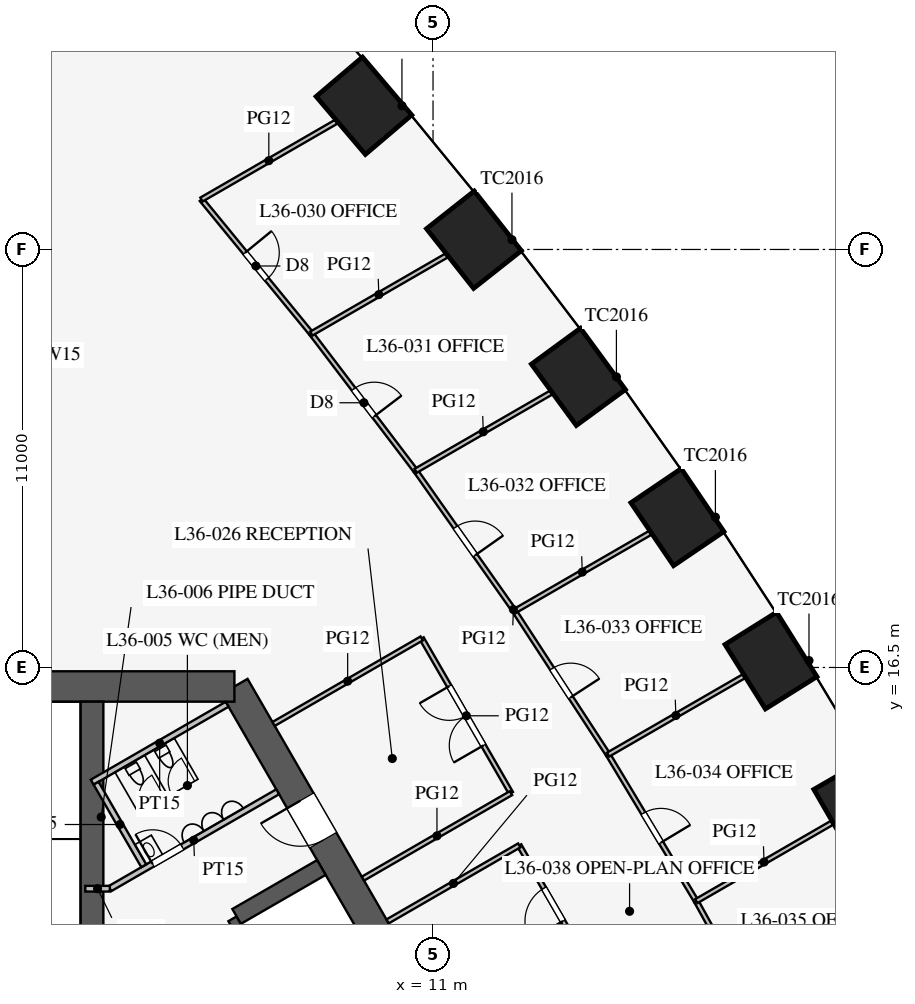
"""IFC4 building model, lengths in metres.
Left out: names, types, materials, properties, quantities, classifications, styles, units other than length and angle.
Written with IfcOpenShell. Run it as: python <this file> out.ifc"""

import sys

from ifc_helpers import new_model, si_unit, direction, frame, frame_2d, origin, origin_2d, place, context, subcontext, project, spatial, rectangle, extrude, element, fill, save


model = new_model("IFC4")
c1 = context("Model", 3, precision=1e-05, world=origin(), true_north=direction((0.0, 1.0)))
c2 = subcontext(c1, "Body", "Model", "MODEL_VIEW")
j1 = project(units=[si_unit("LENGTHUNIT", "METRE"), si_unit("PLANEANGLEUNIT", "RADIAN")], contexts=[c1])
p1 = place(None, origin())
s1 = spatial("IfcSite", under=j1, at=p1, CompositionType="ELEMENT")
p2 = place(p1, origin())
s2 = spatial("IfcBuilding", under=s1, at=p2, CompositionType="ELEMENT")
p3 = place(p2, frame((0.0, 0.0, 157.7)))
s3 = spatial("IfcBuildingStorey", under=s2, at=p3, CompositionType="ELEMENT", Elevation=157.7)
for number, where, z_axis, x_axis in (
    (1, (22.213, 12.825, 0.0), (0.0, 0.0, 1.0), (-0.5, 0.866, 0.0)),
    (2, (19.893, 16.681, 0.0), (0.0, 0.0, 1.0), (-0.531, 0.847, 0.0)),
    (3, (17.43, 20.456, 0.0), (0.0, 0.0, 1.0), (-0.561, 0.828, 0.0)),
    (4, (14.825, 24.148, 0.0), (0.0, 0.0, 1.0), (-0.591, 0.807, 0.0)),
    (5, (12.077, 27.757, 0.0), (0.0, 0.0, 1.0), (-0.62, 0.785, 0.0)),
    (6, (9.182, 31.282, 0.0), (0.0, 0.0, 1.0), (-0.648, 0.762, 0.0)),
):
    element("IfcColumn", number, at=place(p3, frame(where, z_axis=z_axis, x_axis=x_axis)), inside=s3, PredefinedType="COLUMN", context=c2, shape_type="SweptSolid", body=[
        extrude(rectangle(XDim=2.0, YDim=1.6, at=origin_2d()), origin(), (0.0, 0.0, 1.0), 4.2),
    ])
p4 = place(p3, frame((16.743, -3.0, 0.0), z_axis=(0.0, 0.0, 1.0), x_axis=(-0.500002442456, 0.866023993627, 0.0)))
e7 = element("IfcWall", 7, at=p4, inside=s3, PredefinedType="SHEAR", context=c2, shape_type="SweptSolid", body=[
    extrude(rectangle(XDim=21.939, YDim=0.8, at=frame_2d((10.97, 0.0))), origin(), (0.0, 0.0, 1.0), 4.2),
])
p5 = place(p4, frame((17.27, 0.0, 0.0)))
e8 = element("IfcOpeningElement", 8, at=p5, cuts=e7, PredefinedType="OPENING", context=c2, shape_type="SweptSolid", body=[
    extrude(rectangle(XDim=1.2, YDim=2.1, at=frame_2d((0.6, 1.05))), frame((0.0, 0.41, 0.0), z_axis=(0.0, -1.0, 0.0), x_axis=(1.0, 0.0, 0.0)), (0.0, 0.0, 1.0), 0.82),
])
p6 = place(p4, frame((3.47, 0.0, 0.0)))
e9 = element("IfcOpeningElement", 9, at=p6, cuts=e7, PredefinedType="OPENING", context=c2, shape_type="SweptSolid", body=[
    extrude(rectangle(XDim=1.2, YDim=2.1, at=frame_2d((0.6, 1.05))), frame((0.0, 0.41, 0.0), z_axis=(0.0, -1.0, 0.0), x_axis=(1.0, 0.0, 0.0)), (0.0, 0.0, 1.0), 0.82),
])
p7 = place(p3, frame((5.773, 16.0, 0.0), z_axis=(0.0, 0.0, 1.0), x_axis=(-1.0, 0.0, 0.0)))
e10 = element("IfcWall", 10, at=p7, inside=s3, PredefinedType="SHEAR", context=c2, shape_type="SweptSolid", body=[
    extrude(rectangle(XDim=11.547, YDim=0.8, at=frame_2d((5.773, 0.0))), origin(), (0.0, 0.0, 1.0), 4.2),
])
p8 = place(p3, frame((11.424, 0.014, 0.0), z_axis=(0.0, 0.0, 1.0), x_axis=(-0.500001763848, 0.866024385424, 0.0)))
e11 = element("IfcWall", 11, at=p8, inside=s3, PredefinedType="SHEAR", context=c2, shape_type="SweptSolid", body=[
    extrude(rectangle(XDim=11.4, YDim=0.25, at=frame_2d((5.7, 0.0))), origin(), (0.0, 0.0, 1.0), 4.2),
])
p9 = place(p8, frame((0.975, 0.0, 0.0)))
e12 = element("IfcOpeningElement", 12, at=p9, cuts=e11, PredefinedType="OPENING", context=c2, shape_type="SweptSolid", body=[
    extrude(rectangle(XDim=0.9, YDim=2.1, at=frame_2d((0.45, 1.05))), frame((0.0, 0.135, 0.0), z_axis=(0.0, -1.0, 0.0), x_axis=(1.0, 0.0, 0.0)), (0.0, 0.0, 1.0), 0.27),
])
p10 = place(p8, frame((3.825, 0.0, 0.0)))
e13 = element("IfcOpeningElement", 13, at=p10, cuts=e11, PredefinedType="OPENING", context=c2, shape_type="SweptSolid", body=[
    extrude(rectangle(XDim=0.9, YDim=2.1, at=frame_2d((0.45, 1.05))), frame((0.0, 0.135, 0.0), z_axis=(0.0, -1.0, 0.0), x_axis=(1.0, 0.0, 0.0)), (0.0, 0.0, 1.0), 0.27),
])
p11 = place(p3, frame((5.832, 9.949, 0.0), z_axis=(0.0, 0.0, 1.0), x_axis=(0.866029291668, 0.499993265928, 0.0)))
e14 = element("IfcWall", 14, at=p11, inside=s3, PredefinedType="SHEAR", context=c2, shape_type="SweptSolid", body=[
    extrude(rectangle(XDim=2.575, YDim=0.45, at=frame_2d((1.288, 0.0))), origin(), (0.0, 0.0, 1.0), 4.2),
])
p12 = place(p3, frame((2.025, 6.525, 0.0), z_axis=(0.0, 0.0, 1.0), x_axis=(0.0, 1.0, 0.0)))
e15 = element("IfcWall", 15, at=p12, inside=s3, PredefinedType="SHEAR", context=c2, shape_type="SweptSolid", body=[
    extrude(rectangle(XDim=9.075, YDim=0.6, at=frame_2d((4.538, 0.0))), origin(), (0.0, 0.0, 1.0), 4.2),
])
p13 = place(p3, frame((2.495, 10.678, 0.0), z_axis=(0.0, 0.0, 1.0), x_axis=(0.86602216432, 0.500005610874, 0.0)))
e16 = element("IfcWall", 16, at=p13, inside=s3, PredefinedType="PARTITIONING", context=c2, shape_type="SweptSolid", body=[
    extrude(rectangle(XDim=5.1, YDim=0.15, at=frame_2d((2.55, 0.0))), origin(), (0.0, 0.0, 1.0), 4.0),
])
p14 = place(p13, frame((1.3, 0.0, 0.0)))
e17 = element("IfcOpeningElement", 17, at=p14, cuts=e16, PredefinedType="OPENING", context=c2, shape_type="SweptSolid", body=[
    extrude(rectangle(XDim=0.9, YDim=2.1, at=frame_2d((0.45, 1.05))), frame((0.0, 0.085, 0.0), z_axis=(0.0, -1.0, 0.0), x_axis=(1.0, 0.0, 0.0)), (0.0, 0.0, 1.0), 0.17),
])
p15 = place(p3, frame((2.495, 10.678, 0.0), z_axis=(0.0, 0.0, 1.0), x_axis=(-1.0, 0.0, 0.0)))
e18 = element("IfcWall", 18, at=p15, inside=s3, PredefinedType="PARTITIONING", context=c2, shape_type="SweptSolid", body=[
    extrude(rectangle(XDim=0.645, YDim=0.15, at=frame_2d((0.323, 0.0))), origin(), (0.0, 0.0, 1.0), 4.0),
])
p16 = place(p3, frame((2.031, 13.482, 0.0), z_axis=(0.0, 0.0, 1.0), x_axis=(0.866050731258, 0.499956128963, 0.0)))
e19 = element("IfcWall", 19, at=p16, inside=s3, PredefinedType="PARTITIONING", context=c2, shape_type="SweptSolid", body=[
    extrude(rectangle(XDim=4.1, YDim=0.15, at=frame_2d((2.05, 0.0))), origin(), (0.0, 0.0, 1.0), 4.0),
])
p17 = place(p3, frame((3.389, 11.281, 0.0), z_axis=(0.0, 0.0, 1.0), x_axis=(-0.499989096993, 0.866031698547, 0.0)))
e20 = element("IfcWall", 20, at=p17, inside=s3, PredefinedType="PARTITIONING", context=c2, shape_type="SweptSolid", body=[
    extrude(rectangle(XDim=2.51, YDim=0.15, at=frame_2d((1.255, 0.0))), origin(), (0.0, 0.0, 1.0), 4.0),
])
p18 = place(p3, frame((13.052, 13.194, 0.0), z_axis=(0.0, 0.0, 1.0), x_axis=(-0.499977259774, 0.866038532462, 0.0)))
e21 = element("IfcWall", 21, at=p18, inside=s3, PredefinedType="PARTITIONING", context=c2, shape_type="SweptSolid", body=[
    extrude(rectangle(XDim=4.7, YDim=0.12, at=frame_2d((2.35, 0.0))), origin(), (0.0, 0.0, 1.0), 2.9),
])
p19 = place(p18, frame((1.45, 0.0, 0.15)))
e22 = element("IfcOpeningElement", 22, at=p19, cuts=e21, PredefinedType="OPENING", context=c2, shape_type="SweptSolid", body=[
    extrude(rectangle(XDim=1.8, YDim=2.1, at=frame_2d((0.9, 1.05))), frame((0.0, 0.07, 0.0), z_axis=(0.0, -1.0, 0.0), x_axis=(1.0, 0.0, 0.0)), (0.0, 0.0, 1.0), 0.14),
])
p20 = place(p3, frame((15.069, 8.7, 0.0), z_axis=(0.0, 0.0, 1.0), x_axis=(-0.500012057535, 0.866018442252, 0.0)))
e23 = element("IfcWall", 23, at=p20, inside=s3, PredefinedType="PARTITIONING", context=c2, shape_type="SweptSolid", body=[
    extrude(rectangle(XDim=3.6, YDim=0.12, at=frame_2d((1.8, 0.0))), origin(), (0.0, 0.0, 1.0), 2.9),
])
p21 = place(p20, frame((1.3, 0.0, 0.15)))
e24 = element("IfcOpeningElement", 24, at=p21, cuts=e23, PredefinedType="OPENING", context=c2, shape_type="SweptSolid", body=[
    extrude(rectangle(XDim=1.0, YDim=2.1, at=frame_2d((0.5, 1.05))), frame((0.0, 0.07, 0.0), z_axis=(0.0, -1.0, 0.0), x_axis=(1.0, 0.0, 0.0)), (0.0, 0.0, 1.0), 0.14),
])
p22 = place(p3, frame((9.805, 9.818, 0.0), z_axis=(0.0, 0.0, 1.0), x_axis=(0.866026010844, 0.49999894854, 0.0)))
e25 = element("IfcWall", 25, at=p22, inside=s3, PredefinedType="PARTITIONING", context=c2, shape_type="SweptSolid", body=[
    extrude(rectangle(XDim=4.0, YDim=0.12, at=frame_2d((2.0, 0.0))), origin(), (0.0, 0.0, 1.0), 2.9),
])
p23 = place(p3, frame((9.155, 10.944, 0.0), z_axis=(0.0, 0.0, 1.0), x_axis=(0.866017533419, 0.500013631625, 0.0)))
e26 = element("IfcWall", 26, at=p23, inside=s3, PredefinedType="PARTITIONING", context=c2, shape_type="SweptSolid", body=[
    extrude(rectangle(XDim=4.5, YDim=0.12, at=frame_2d((2.25, 0.0))), origin(), (0.0, 0.0, 1.0), 2.9),
])
p24 = place(p3, frame((6.805, 15.014, 0.0), z_axis=(0.0, 0.0, 1.0), x_axis=(0.866031096941, 0.499990139034, 0.0)))
e27 = element("IfcWall", 27, at=p24, inside=s3, PredefinedType="PARTITIONING", context=c2, shape_type="SweptSolid", body=[
    extrude(rectangle(XDim=4.5, YDim=0.12, at=frame_2d((2.25, 0.0))), origin(), (0.0, 0.0, 1.0), 2.9),
])
p25 = place(p3, frame((17.927, 10.35, 0.0), z_axis=(0.0, 0.0, 1.0), x_axis=(-0.515548366618, 0.856860479703, 0.0)))
e28 = element("IfcWall", 28, at=p25, inside=s3, PredefinedType="PARTITIONING", context=c2, shape_type="SweptSolid", body=[
    extrude(rectangle(XDim=4.501, YDim=0.12, at=frame_2d((2.25, 0.0))), origin(), (0.0, 0.0, 1.0), 2.9),
])
p26 = place(p25, frame((1.8, 0.0, 0.15)))
e29 = element("IfcOpeningElement", 29, at=p26, cuts=e28, PredefinedType="OPENING", context=c2, shape_type="SweptSolid", body=[
    extrude(rectangle(XDim=0.9, YDim=2.1, at=frame_2d((0.45, 1.05))), frame((0.0, 0.07, 0.0), z_axis=(0.0, -1.0, 0.0), x_axis=(1.0, 0.0, 0.0)), (0.0, 0.0, 1.0), 0.14),
])
p27 = place(p3, frame((10.543, 21.675, 0.0), z_axis=(0.0, 0.0, 1.0), x_axis=(-0.605274299339, 0.796016973789, 0.0)))
e30 = element("IfcWall", 30, at=p27, inside=s3, PredefinedType="PARTITIONING", context=c2, shape_type="SweptSolid", body=[
    extrude(rectangle(XDim=4.536, YDim=0.12, at=frame_2d((2.268, 0.0))), origin(), (0.0, 0.0, 1.0), 2.9),
])
p28 = place(p27, frame((1.8, 0.0, 0.15)))
e31 = element("IfcOpeningElement", 31, at=p28, cuts=e30, PredefinedType="OPENING", context=c2, shape_type="SweptSolid", body=[
    extrude(rectangle(XDim=0.9, YDim=2.1, at=frame_2d((0.45, 1.05))), frame((0.0, 0.07, 0.0), z_axis=(0.0, -1.0, 0.0), x_axis=(1.0, 0.0, 0.0)), (0.0, 0.0, 1.0), 0.14),
])
p29 = place(p3, frame((7.797, 25.286, 0.0), z_axis=(0.0, 0.0, 1.0), x_axis=(-0.633843962561, 0.773460943503, 0.0)))
e32 = element("IfcWall", 32, at=p29, inside=s3, PredefinedType="PARTITIONING", context=c2, shape_type="SweptSolid", body=[
    extrude(rectangle(XDim=4.561, YDim=0.12, at=frame_2d((2.28, 0.0))), origin(), (0.0, 0.0, 1.0), 2.9),
])
p30 = place(p29, frame((1.85, 0.0, 0.15)))
e33 = element("IfcOpeningElement", 33, at=p30, cuts=e32, PredefinedType="OPENING", context=c2, shape_type="SweptSolid", body=[
    extrude(rectangle(XDim=0.9, YDim=2.1, at=frame_2d((0.45, 1.05))), frame((0.0, 0.07, 0.0), z_axis=(0.0, -1.0, 0.0), x_axis=(1.0, 0.0, 0.0)), (0.0, 0.0, 1.0), 0.14),
])
p31 = place(p3, frame((15.606, 14.206, 0.0), z_axis=(0.0, 0.0, 1.0), x_axis=(-0.546069464151, 0.837739900161, 0.0)))
e34 = element("IfcWall", 34, at=p31, inside=s3, PredefinedType="PARTITIONING", context=c2, shape_type="SweptSolid", body=[
    extrude(rectangle(XDim=4.507, YDim=0.12, at=frame_2d((2.253, 0.0))), origin(), (0.0, 0.0, 1.0), 2.9),
])
p32 = place(p31, frame((1.8, 0.0, 0.15)))
e35 = element("IfcOpeningElement", 35, at=p32, cuts=e34, PredefinedType="OPENING", context=c2, shape_type="SweptSolid", body=[
    extrude(rectangle(XDim=0.9, YDim=2.1, at=frame_2d((0.45, 1.05))), frame((0.0, 0.07, 0.0), z_axis=(0.0, -1.0, 0.0), x_axis=(1.0, 0.0, 0.0)), (0.0, 0.0, 1.0), 0.14),
])
p33 = place(p3, frame((13.145, 17.982, 0.0), z_axis=(0.0, 0.0, 1.0), x_axis=(-0.575987178736, 0.817458726745, 0.0)))
e36 = element("IfcWall", 36, at=p33, inside=s3, PredefinedType="PARTITIONING", context=c2, shape_type="SweptSolid", body=[
    extrude(rectangle(XDim=4.518, YDim=0.12, at=frame_2d((2.259, 0.0))), origin(), (0.0, 0.0, 1.0), 2.9),
])
p34 = place(p33, frame((1.8, 0.0, 0.15)))
e37 = element("IfcOpeningElement", 37, at=p34, cuts=e36, PredefinedType="OPENING", context=c2, shape_type="SweptSolid", body=[
    extrude(rectangle(XDim=0.9, YDim=2.1, at=frame_2d((0.45, 1.05))), frame((0.0, 0.07, 0.0), z_axis=(0.0, -1.0, 0.0), x_axis=(1.0, 0.0, 0.0)), (0.0, 0.0, 1.0), 0.14),
])
p35 = place(p3, frame((20.106, 6.412, 0.0), z_axis=(0.0, 0.0, 1.0), x_axis=(-0.484292898211, 0.874905931368, 0.0)))
e38 = element("IfcWall", 38, at=p35, inside=s3, PredefinedType="PARTITIONING", context=c2, shape_type="SweptSolid", body=[
    extrude(rectangle(XDim=4.501, YDim=0.12, at=frame_2d((2.25, 0.0))), origin(), (0.0, 0.0, 1.0), 2.9),
])
p36 = place(p35, frame((1.8, 0.0, 0.15)))
e39 = element("IfcOpeningElement", 39, at=p36, cuts=e38, PredefinedType="OPENING", context=c2, shape_type="SweptSolid", body=[
    extrude(rectangle(XDim=0.9, YDim=2.1, at=frame_2d((0.45, 1.05))), frame((0.0, 0.07, 0.0), z_axis=(0.0, -1.0, 0.0), x_axis=(1.0, 0.0, 0.0)), (0.0, 0.0, 1.0), 0.14),
])
p37 = place(p3, frame((17.927, 10.35, 0.0), z_axis=(0.0, 0.0, 1.0), x_axis=(0.866009926209, 0.50002680699, 0.0)))
e40 = element("IfcWall", 40, at=p37, inside=s3, PredefinedType="PARTITIONING", context=c2, shape_type="SweptSolid", body=[
    extrude(rectangle(XDim=4.12, YDim=0.12, at=frame_2d((2.06, 0.0))), origin(), (0.0, 0.0, 1.0), 2.8),
])
p38 = place(p3, frame((10.543, 21.675, 0.0), z_axis=(0.0, 0.0, 1.0), x_axis=(0.866019409031, 0.500010383074, 0.0)))
e41 = element("IfcWall", 41, at=p38, inside=s3, PredefinedType="PARTITIONING", context=c2, shape_type="SweptSolid", body=[
    extrude(rectangle(XDim=4.11, YDim=0.12, at=frame_2d((2.055, 0.0))), origin(), (0.0, 0.0, 1.0), 2.6),
])
p39 = place(p3, frame((7.797, 25.286, 0.0), z_axis=(0.0, 0.0, 1.0), x_axis=(0.866019112135, 0.500010897298, 0.0)))
e42 = element("IfcWall", 42, at=p39, inside=s3, PredefinedType="PARTITIONING", context=c2, shape_type="SweptSolid", body=[
    extrude(rectangle(XDim=4.103, YDim=0.12, at=frame_2d((2.052, 0.0))), origin(), (0.0, 0.0, 1.0), 2.8),
])
p40 = place(p3, frame((4.906, 28.813, 0.0), z_axis=(0.0, 0.0, 1.0), x_axis=(0.86601374377, 0.500020195194, 0.0)))
e43 = element("IfcWall", 43, at=p40, inside=s3, PredefinedType="PARTITIONING", context=c2, shape_type="SweptSolid", body=[
    extrude(rectangle(XDim=4.093, YDim=0.12, at=frame_2d((2.046, 0.0))), origin(), (0.0, 0.0, 1.0), 2.9),
])
p41 = place(p3, frame((15.606, 14.206, 0.0), z_axis=(0.0, 0.0, 1.0), x_axis=(0.866016800201, 0.500014901547, 0.0)))
e44 = element("IfcWall", 44, at=p41, inside=s3, PredefinedType="PARTITIONING", context=c2, shape_type="SweptSolid", body=[
    extrude(rectangle(XDim=4.119, YDim=0.12, at=frame_2d((2.06, 0.0))), origin(), (0.0, 0.0, 1.0), 2.8),
])
p42 = place(p3, frame((13.145, 17.982, 0.0), z_axis=(0.0, 0.0, 1.0), x_axis=(0.866018637367, 0.500011719595, 0.0)))
e45 = element("IfcWall", 45, at=p42, inside=s3, PredefinedType="PARTITIONING", context=c2, shape_type="SweptSolid", body=[
    extrude(rectangle(XDim=4.116, YDim=0.12, at=frame_2d((2.058, 0.0))), origin(), (0.0, 0.0, 1.0), 2.9),
])
p43 = place(p14, origin())
e46 = element("IfcDoor", 46, at=p43, inside=s3, OperationType="SINGLE_SWING_LEFT", PredefinedType="DOOR", context=c2, shape_type="SweptSolid", body=[
    extrude(rectangle(XDim=0.9, YDim=2.1, at=frame_2d((0.45, 1.05))), frame((0.0, 0.025, 0.0), z_axis=(0.0, -1.0, 0.0), x_axis=(1.0, 0.0, 0.0)), (0.0, 0.0, 1.0), 0.05),
])
fill(e17, e46)
p44 = place(p5, origin())
e47 = element("IfcDoor", 47, at=p44, inside=s3, OperationType="SINGLE_SWING_RIGHT", PredefinedType="DOOR", context=c2, shape_type="SweptSolid", body=[
    extrude(rectangle(XDim=1.2, YDim=2.1, at=frame_2d((0.6, 1.05))), frame((0.0, 0.025, 0.0), z_axis=(0.0, -1.0, 0.0), x_axis=(1.0, 0.0, 0.0)), (0.0, 0.0, 1.0), 0.05),
])
fill(e8, e47)
p45 = place(p19, origin())
e48 = element("IfcDoor", 48, at=p45, inside=s3, OperationType="DOUBLE_DOOR_SINGLE_SWING", PredefinedType="DOOR", context=c2, shape_type="SweptSolid", body=[
    extrude(rectangle(XDim=1.8, YDim=2.1, at=frame_2d((0.9, 1.05))), frame((0.0, 0.025, 0.0), z_axis=(0.0, -1.0, 0.0), x_axis=(1.0, 0.0, 0.0)), (0.0, 0.0, 1.0), 0.05),
])
fill(e22, e48)
p46 = place(p21, origin())
e49 = element("IfcDoor", 49, at=p46, inside=s3, OperationType="SINGLE_SWING_LEFT", PredefinedType="DOOR", context=c2, shape_type="SweptSolid", body=[
    extrude(rectangle(XDim=1.0, YDim=2.1, at=frame_2d((0.5, 1.05))), frame((0.0, 0.025, 0.0), z_axis=(0.0, -1.0, 0.0), x_axis=(1.0, 0.0, 0.0)), (0.0, 0.0, 1.0), 0.05),
])
fill(e24, e49)
p47 = place(p30, frame((0.9, 0.0, 0.0), z_axis=(0.0, 0.0, 1.0), x_axis=(-1.0, 0.0, 0.0)))
e50 = element("IfcDoor", 50, at=p47, inside=s3, OperationType="SINGLE_SWING_LEFT", PredefinedType="DOOR", context=c2, shape_type="SweptSolid", body=[
    extrude(rectangle(XDim=0.9, YDim=2.1, at=frame_2d((0.45, 1.05))), frame((0.0, 0.025, 0.0), z_axis=(0.0, -1.0, 0.0), x_axis=(1.0, 0.0, 0.0)), (0.0, 0.0, 1.0), 0.05),
])
fill(e33, e50)
p48 = place(p28, frame((0.9, 0.0, 0.0), z_axis=(0.0, 0.0, 1.0), x_axis=(-1.0, 0.0, 0.0)))
e51 = element("IfcDoor", 51, at=p48, inside=s3, OperationType="SINGLE_SWING_RIGHT", PredefinedType="DOOR", context=c2, shape_type="SweptSolid", body=[
    extrude(rectangle(XDim=0.9, YDim=2.1, at=frame_2d((0.45, 1.05))), frame((0.0, 0.025, 0.0), z_axis=(0.0, -1.0, 0.0), x_axis=(1.0, 0.0, 0.0)), (0.0, 0.0, 1.0), 0.05),
])
fill(e31, e51)
p49 = place(p34, frame((0.9, 0.0, 0.0), z_axis=(0.0, 0.0, 1.0), x_axis=(-1.0, 0.0, 0.0)))
e52 = element("IfcDoor", 52, at=p49, inside=s3, OperationType="SINGLE_SWING_RIGHT", PredefinedType="DOOR", context=c2, shape_type="SweptSolid", body=[
    extrude(rectangle(XDim=0.9, YDim=2.1, at=frame_2d((0.45, 1.05))), frame((0.0, 0.025, 0.0), z_axis=(0.0, -1.0, 0.0), x_axis=(1.0, 0.0, 0.0)), (0.0, 0.0, 1.0), 0.05),
])
fill(e37, e52)
p50 = place(p32, frame((0.9, 0.0, 0.0), z_axis=(0.0, 0.0, 1.0), x_axis=(-1.0, 0.0, 0.0)))
e53 = element("IfcDoor", 53, at=p50, inside=s3, OperationType="SINGLE_SWING_RIGHT", PredefinedType="DOOR", context=c2, shape_type="SweptSolid", body=[
    extrude(rectangle(XDim=0.9, YDim=2.1, at=frame_2d((0.45, 1.05))), frame((0.0, 0.025, 0.0), z_axis=(0.0, -1.0, 0.0), x_axis=(1.0, 0.0, 0.0)), (0.0, 0.0, 1.0), 0.05),
])
fill(e35, e53)
p51 = place(p26, frame((0.9, 0.0, 0.0), z_axis=(0.0, 0.0, 1.0), x_axis=(-1.0, 0.0, 0.0)))
e54 = element("IfcDoor", 54, at=p51, inside=s3, OperationType="SINGLE_SWING_RIGHT", PredefinedType="DOOR", context=c2, shape_type="SweptSolid", body=[
    extrude(rectangle(XDim=0.9, YDim=2.1, at=frame_2d((0.45, 1.05))), frame((0.0, 0.025, 0.0), z_axis=(0.0, -1.0, 0.0), x_axis=(1.0, 0.0, 0.0)), (0.0, 0.0, 1.0), 0.05),
])
fill(e29, e54)
save(model, sys.argv[1])
